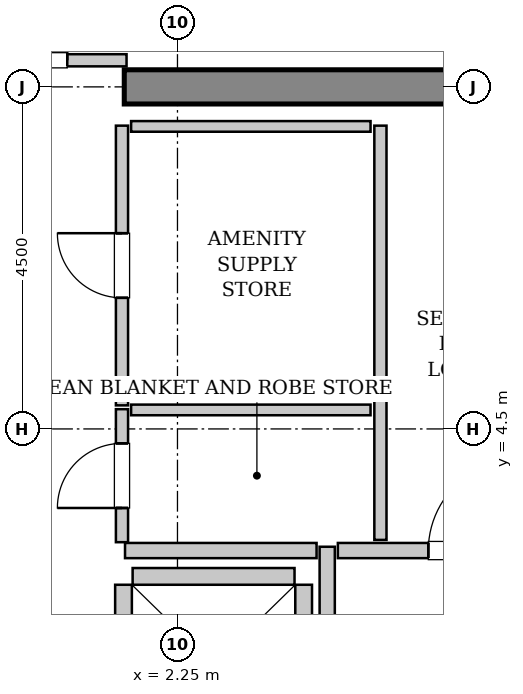
"""IFC4 building model, lengths in metres.
Left out: names, types, materials, properties, quantities, classifications, styles, units other than length and angle.
Written with IfcOpenShell. Run it as: python <this file> out.ifc"""

import sys

from ifc_helpers import new_model, si_unit, direction, frame, frame_2d, origin, place, context, subcontext, project, spatial, rectangle, extrude, source, transform, mapped, element, fill, save


model = new_model("IFC4")
c1 = context("Model", 3, precision=1e-05, world=origin(), true_north=direction((0.0, 1.0)))
c2 = subcontext(c1, "Body", "Model", "MODEL_VIEW")
j1 = project(units=[si_unit("LENGTHUNIT", "METRE"), si_unit("PLANEANGLEUNIT", "RADIAN")], contexts=[c1])
p1 = place(None, origin())
s1 = spatial("IfcSite", under=j1, at=p1, CompositionType="ELEMENT")
p2 = place(p1, origin())
s2 = spatial("IfcBuilding", under=s1, at=p2, CompositionType="ELEMENT")
p3 = place(p2, frame((0.0, 0.0, 237.0)))
s3 = spatial("IfcBuildingStorey", under=s2, at=p3, CompositionType="ELEMENT", Elevation=237.0)
m1 = source(origin(), c2, "Body", "SweptSolid", [
    extrude(rectangle(XDim=9.925, YDim=0.45, at=frame_2d((4.962, 0.0))), origin(), (0.0, 0.0, 1.0), 3.8),
])
p4 = place(p3, frame((1.55, 9.0, 0.0), z_axis=(0.0, 0.0, 1.0), x_axis=(1.0, 0.0, 0.0)))
e1 = element("IfcWall", 1, at=p4, inside=s3, PredefinedType="SHEAR", context=c2, shape_type="MappedRepresentation", body=[
    mapped(m1, transform((0.0, 0.0, 0.0), x_axis=(1.0, 0.0, 0.0), y_axis=(0.0, 1.0, 0.0), z_axis=(0.0, 0.0, 1.0), scale=1.0)),
])
m2 = source(origin(), c2, "Body", "SweptSolid", [
    extrude(rectangle(XDim=4.9, YDim=0.22, at=frame_2d((2.45, 0.0))), origin(), (0.0, 0.0, 1.0), 3.535),
])
for number, where, z_axis, x_axis in (
    (2, (1.54, 2.45, 0.0), (0.0, 0.0, 1.0), (0.0, -1.0, 0.0)),
    (3, (3.91, -2.45, 0.0), (0.0, 0.0, 1.0), (0.0, 1.0, 0.0)),
):
    element("IfcWall", number, at=place(p3, frame(where, z_axis=z_axis, x_axis=x_axis)), inside=s3, PredefinedType="SOLIDWALL", context=c2, shape_type="MappedRepresentation", body=[
        mapped(m2, transform((0.0, 0.0, 0.0), x_axis=(1.0, 0.0, 0.0), y_axis=(0.0, 1.0, 0.0), z_axis=(0.0, 0.0, 1.0), scale=1.0)),
    ])
m3 = source(origin(), c2, "Body", "SweptSolid", [
    extrude(rectangle(XDim=2.13, YDim=0.22, at=frame_2d((1.065, 0.0))), origin(), (0.0, 0.0, 1.0), 3.535),
])
p5 = place(p3, frame((3.79, 2.56, 0.0), z_axis=(0.0, 0.0, 1.0), x_axis=(-1.0, 0.0, 0.0)))
e4 = element("IfcWall", 4, at=p5, inside=s3, PredefinedType="SOLIDWALL", context=c2, shape_type="MappedRepresentation", body=[
    mapped(m3, transform((0.0, 0.0, 0.0), x_axis=(1.0, 0.0, 0.0), y_axis=(0.0, 1.0, 0.0), z_axis=(0.0, 0.0, 1.0), scale=1.0)),
])
m4 = source(origin(), c2, "Body", "SweptSolid", [
    extrude(rectangle(XDim=5.9, YDim=0.2, at=frame_2d((2.95, 0.0))), origin(), (0.0, 0.0, 1.0), 3.535),
])
p6 = place(p3, frame((4.22, -2.95, 0.0), z_axis=(0.0, 0.0, 1.0), x_axis=(0.0, 1.0, 0.0)))
e5 = element("IfcWall", 5, at=p6, inside=s3, PredefinedType="PARTITIONING", context=c2, shape_type="MappedRepresentation", body=[
    mapped(m4, transform((0.0, 0.0, 0.0), x_axis=(1.0, 0.0, 0.0), y_axis=(0.0, 1.0, 0.0), z_axis=(0.0, 0.0, 1.0), scale=1.0)),
])
m5 = source(origin(), c2, "Body", "SweptSolid", [
    extrude(rectangle(XDim=2.52, YDim=0.2, at=frame_2d((1.26, 0.0))), origin(), (0.0, 0.0, 1.0), 3.535),
])
p7 = place(p3, frame((1.56, 2.9, 0.0), z_axis=(0.0, 0.0, 1.0), x_axis=(1.0, 0.0, 0.0)))
e6 = element("IfcWall", 6, at=p7, inside=s3, PredefinedType="PARTITIONING", context=c2, shape_type="MappedRepresentation", body=[
    mapped(m5, transform((0.0, 0.0, 0.0), x_axis=(1.0, 0.0, 0.0), y_axis=(0.0, 1.0, 0.0), z_axis=(0.0, 0.0, 1.0), scale=1.0)),
])
m6 = source(origin(), c2, "Body", "SweptSolid", [
    extrude(rectangle(XDim=3.04, YDim=0.2, at=frame_2d((1.52, 0.0))), origin(), (0.0, 0.0, 1.0), 3.535),
])
p8 = place(p3, frame((4.36, 2.9, 0.0), z_axis=(0.0, 0.0, 1.0), x_axis=(1.0, 0.0, 0.0)))
e7 = element("IfcWall", 7, at=p8, inside=s3, PredefinedType="PARTITIONING", context=c2, shape_type="MappedRepresentation", body=[
    mapped(m6, transform((0.0, 0.0, 0.0), x_axis=(1.0, 0.0, 0.0), y_axis=(0.0, 1.0, 0.0), z_axis=(0.0, 0.0, 1.0), scale=1.0)),
])
p9 = place(p8, frame((1.19, 0.0, 0.0)))
e8 = element("IfcOpeningElement", 8, at=p9, cuts=e7, PredefinedType="OPENING", context=c2, shape_type="SweptSolid", body=[
    extrude(rectangle(XDim=1.2, YDim=2.15, at=frame_2d((0.6, 1.075))), frame((0.0, 0.11, 0.0), z_axis=(0.0, -1.0, 0.0), x_axis=(1.0, 0.0, 0.0)), (0.0, 0.0, 1.0), 0.22),
])
m7 = source(origin(), c2, "Body", "SweptSolid", [
    extrude(rectangle(XDim=3.16, YDim=0.16, at=frame_2d((1.58, 0.0))), origin(), (0.0, 0.0, 1.0), 2.625),
])
p10 = place(p3, frame((-1.58, 9.35, 0.0), z_axis=(0.0, 0.0, 1.0), x_axis=(1.0, 0.0, 0.0)))
e9 = element("IfcWall", 9, at=p10, inside=s3, PredefinedType="PARTITIONING", context=c2, shape_type="MappedRepresentation", body=[
    mapped(m7, transform((0.0, 0.0, 0.0), x_axis=(1.0, 0.0, 0.0), y_axis=(0.0, 1.0, 0.0), z_axis=(0.0, 0.0, 1.0), scale=1.0)),
])
p11 = place(p10, frame((0.78, 0.0, 0.0)))
e10 = element("IfcOpeningElement", 10, at=p11, cuts=e9, PredefinedType="OPENING", context=c2, shape_type="SweptSolid", body=[
    extrude(rectangle(XDim=1.6, YDim=2.3, at=frame_2d((0.8, 1.15))), frame((0.0, 0.09, 0.0), z_axis=(0.0, -1.0, 0.0), x_axis=(1.0, 0.0, 0.0)), (0.0, 0.0, 1.0), 0.18),
])
m8 = source(origin(), c2, "Body", "SweptSolid", [
    extrude(rectangle(XDim=5.45, YDim=0.16, at=frame_2d((2.725, 0.0))), origin(), (0.0, 0.0, 1.0), 3.535),
])
p12 = place(p3, frame((4.92, 3.04, 0.0), z_axis=(0.0, 0.0, 1.0), x_axis=(0.0, 1.0, 0.0)))
e11 = element("IfcWall", 11, at=p12, inside=s3, PredefinedType="PARTITIONING", context=c2, shape_type="MappedRepresentation", body=[
    mapped(m8, transform((0.0, 0.0, 0.0), x_axis=(1.0, 0.0, 0.0), y_axis=(0.0, 1.0, 0.0), z_axis=(0.0, 0.0, 1.0), scale=1.0)),
])
m9 = source(origin(), c2, "Body", "SweptSolid", [
    extrude(rectangle(XDim=1.75, YDim=0.16, at=frame_2d((0.875, 0.0))), origin(), (0.0, 0.0, 1.0), 3.535),
])
p13 = place(p3, frame((1.52, 3.01, 0.0), z_axis=(0.0, 0.0, 1.0), x_axis=(0.0, 1.0, 0.0)))
e12 = element("IfcWall", 12, at=p13, inside=s3, PredefinedType="PARTITIONING", context=c2, shape_type="MappedRepresentation", body=[
    mapped(m9, transform((0.0, 0.0, 0.0), x_axis=(1.0, 0.0, 0.0), y_axis=(0.0, 1.0, 0.0), z_axis=(0.0, 0.0, 1.0), scale=1.0)),
])
p14 = place(p13, frame((0.45, 0.0, 0.0)))
e13 = element("IfcOpeningElement", 13, at=p14, cuts=e12, PredefinedType="OPENING", context=c2, shape_type="SweptSolid", body=[
    extrude(rectangle(XDim=0.85, YDim=2.1, at=frame_2d((0.425, 1.05))), frame((0.0, 0.09, 0.0), z_axis=(0.0, -1.0, 0.0), x_axis=(1.0, 0.0, 0.0)), (0.0, 0.0, 1.0), 0.18),
])
m10 = source(origin(), c2, "Body", "SweptSolid", [
    extrude(rectangle(XDim=3.15, YDim=0.14, at=frame_2d((1.575, 0.0))), origin(), (0.0, 0.0, 1.0), 3.535),
])
p15 = place(p3, frame((1.64, 4.75, 0.0), z_axis=(0.0, 0.0, 1.0), x_axis=(1.0, 0.0, 0.0)))
e14 = element("IfcWall", 14, at=p15, inside=s3, PredefinedType="PARTITIONING", context=c2, shape_type="MappedRepresentation", body=[
    mapped(m10, transform((0.0, 0.0, 0.0), x_axis=(1.0, 0.0, 0.0), y_axis=(0.0, 1.0, 0.0), z_axis=(0.0, 0.0, 1.0), scale=1.0)),
])
m11 = source(origin(), c2, "Body", "SweptSolid", [
    extrude(rectangle(XDim=3.68, YDim=0.16, at=frame_2d((1.84, 0.0))), origin(), (0.0, 0.0, 1.0), 3.535),
])
p16 = place(p3, frame((1.52, 4.81, 0.0), z_axis=(0.0, 0.0, 1.0), x_axis=(0.0, 1.0, 0.0)))
e15 = element("IfcWall", 15, at=p16, inside=s3, PredefinedType="PARTITIONING", context=c2, shape_type="MappedRepresentation", body=[
    mapped(m11, transform((0.0, 0.0, 0.0), x_axis=(1.0, 0.0, 0.0), y_axis=(0.0, 1.0, 0.0), z_axis=(0.0, 0.0, 1.0), scale=1.0)),
])
p17 = place(p16, frame((1.415, 0.0, 0.0)))
e16 = element("IfcOpeningElement", 16, at=p17, cuts=e15, PredefinedType="OPENING", context=c2, shape_type="SweptSolid", body=[
    extrude(rectangle(XDim=0.85, YDim=2.1, at=frame_2d((0.425, 1.05))), frame((0.0, 0.09, 0.0), z_axis=(0.0, -1.0, 0.0), x_axis=(1.0, 0.0, 0.0)), (0.0, 0.0, 1.0), 0.18),
])
p18 = place(p3, frame((1.64, 8.48, 0.0), z_axis=(0.0, 0.0, 1.0), x_axis=(1.0, 0.0, 0.0)))
e17 = element("IfcWall", 17, at=p18, inside=s3, PredefinedType="PARTITIONING", context=c2, shape_type="MappedRepresentation", body=[
    mapped(m10, transform((0.0, 0.0, 0.0), x_axis=(1.0, 0.0, 0.0), y_axis=(0.0, 1.0, 0.0), z_axis=(0.0, 0.0, 1.0), scale=1.0)),
])
m12 = source(origin(), c2, "Body", "SweptSolid", [
    extrude(rectangle(XDim=1.2, YDim=2.15, at=frame_2d((0.6, 1.075))), frame((0.0, 0.025, 0.0), z_axis=(0.0, -1.0, 0.0), x_axis=(1.0, 0.0, 0.0)), (0.0, 0.0, 1.0), 0.05),
])
p19 = place(p9, origin())
e18 = element("IfcDoor", 18, at=p19, inside=s3, OperationType="SINGLE_SWING_RIGHT", PredefinedType="DOOR", context=c2, shape_type="MappedRepresentation", body=[
    mapped(m12, transform((0.0, 0.0, 0.0), x_axis=(1.0, 0.0, 0.0), y_axis=(0.0, 1.0, 0.0), z_axis=(0.0, 0.0, 1.0), scale=1.0)),
])
fill(e8, e18)
m13 = source(origin(), c2, "Body", "SweptSolid", [
    extrude(rectangle(XDim=1.6, YDim=2.3, at=frame_2d((0.8, 1.15))), frame((0.0, 0.025, 0.0), z_axis=(0.0, -1.0, 0.0), x_axis=(1.0, 0.0, 0.0)), (0.0, 0.0, 1.0), 0.05),
])
p20 = place(p11, origin())
e19 = element("IfcDoor", 19, at=p20, inside=s3, OperationType="DOUBLE_DOOR_SINGLE_SWING", PredefinedType="DOOR", context=c2, shape_type="MappedRepresentation", body=[
    mapped(m13, transform((0.0, 0.0, 0.0), x_axis=(1.0, 0.0, 0.0), y_axis=(0.0, 1.0, 0.0), z_axis=(0.0, 0.0, 1.0), scale=1.0)),
])
fill(e10, e19)
m14 = source(origin(), c2, "Body", "SweptSolid", [
    extrude(rectangle(XDim=0.85, YDim=2.1, at=frame_2d((0.425, 1.05))), frame((0.0, 0.025, 0.0), z_axis=(0.0, -1.0, 0.0), x_axis=(1.0, 0.0, 0.0)), (0.0, 0.0, 1.0), 0.05),
])
p21 = place(p14, origin())
e20 = element("IfcDoor", 20, at=p21, inside=s3, OperationType="SINGLE_SWING_LEFT", PredefinedType="DOOR", context=c2, shape_type="MappedRepresentation", body=[
    mapped(m14, transform((0.0, 0.0, 0.0), x_axis=(1.0, 0.0, 0.0), y_axis=(0.0, 1.0, 0.0), z_axis=(0.0, 0.0, 1.0), scale=1.0)),
])
fill(e13, e20)
p22 = place(p17, origin())
e21 = element("IfcDoor", 21, at=p22, inside=s3, OperationType="SINGLE_SWING_RIGHT", PredefinedType="DOOR", context=c2, shape_type="MappedRepresentation", body=[
    mapped(m14, transform((0.0, 0.0, 0.0), x_axis=(1.0, 0.0, 0.0), y_axis=(0.0, 1.0, 0.0), z_axis=(0.0, 0.0, 1.0), scale=1.0)),
])
fill(e16, e21)
save(model, sys.argv[1])
